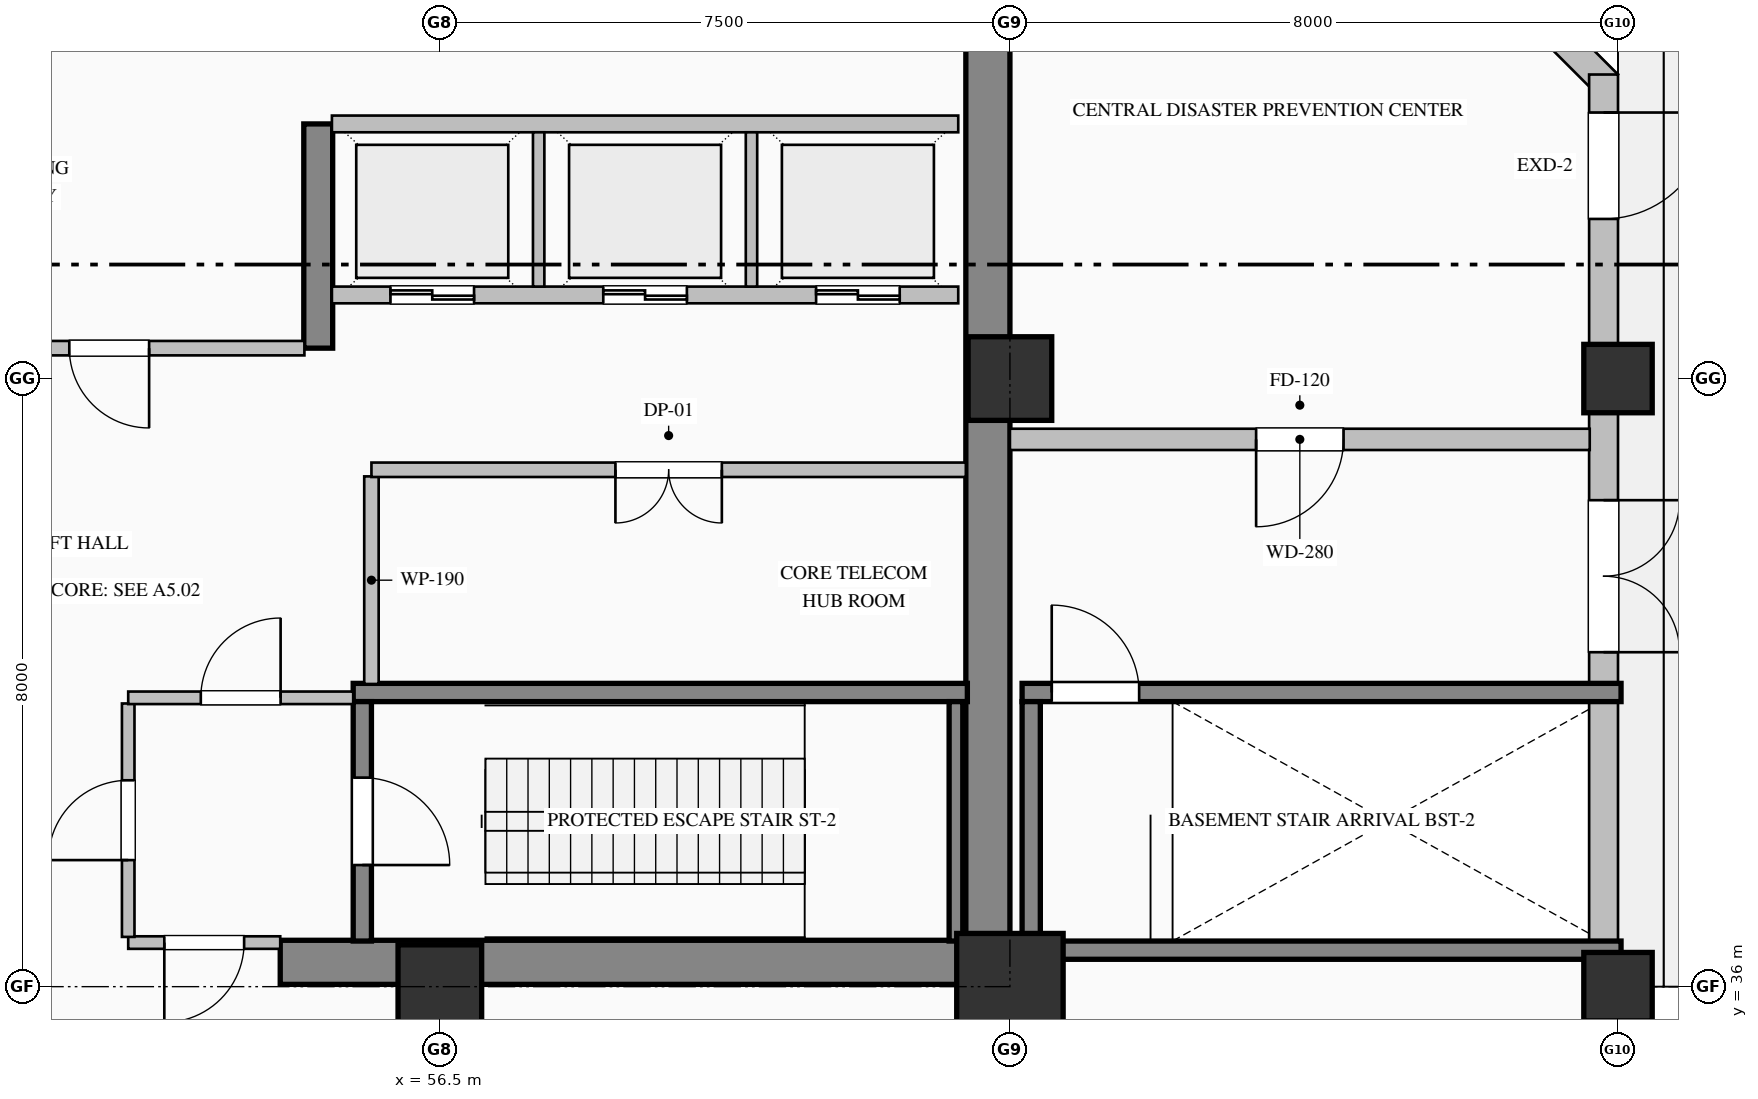
"""IFC4 building model, lengths in metres.
Left out: names, types, materials, properties, quantities, classifications, styles, units other than length and angle.
Written with IfcOpenShell. Run it as: python <this file> out.ifc"""

import sys

from ifc_helpers import new_model, si_unit, direction, frame, frame_2d, origin, origin_2d, place, context, subcontext, project, spatial, rectangle, hollow_rectangle, extrude, element, fill, save


model = new_model("IFC4")
c1 = context("Model", 3, precision=1e-05, world=origin(), true_north=direction((0.0, 1.0)))
c2 = subcontext(c1, "Body", "Model", "MODEL_VIEW")
j1 = project(units=[si_unit("LENGTHUNIT", "METRE"), si_unit("PLANEANGLEUNIT", "RADIAN")], contexts=[c1])
p1 = place(None, origin())
s1 = spatial("IfcSite", under=j1, at=p1, CompositionType="ELEMENT")
p2 = place(p1, origin())
s2 = spatial("IfcBuilding", under=s1, at=p2, CompositionType="ELEMENT")
p3 = place(p2, origin())
s3 = spatial("IfcBuildingStorey", under=s2, at=p3, CompositionType="ELEMENT", Elevation=0.0)
p4 = place(p3, frame((63.71, 36.32, 0.0), z_axis=(0.0, 0.0, 1.0), x_axis=(0.0, 1.0, 0.0)))
e1 = element("IfcWall", 1, at=p4, inside=s3, PredefinedType="SHEAR", context=c2, shape_type="SweptSolid", body=[
    extrude(rectangle(XDim=15.1, YDim=0.58, at=frame_2d((7.55, 0.0))), origin(), (0.0, 0.0, 1.0), 5.72),
])
p5 = place(p3, frame((54.4, 36.32, 0.0), z_axis=(0.0, 0.0, 1.0), x_axis=(1.0, 0.0, 0.0)))
e2 = element("IfcWall", 2, at=p5, inside=s3, PredefinedType="SHEAR", context=c2, shape_type="SweptSolid", body=[
    extrude(rectangle(XDim=9.6, YDim=0.58, at=frame_2d((4.8, 0.0))), origin(), (0.0, 0.0, 1.0), 6.0),
])
p6 = place(p3, frame((54.9, 44.4, 0.0), z_axis=(0.0, 0.0, 1.0), x_axis=(0.0, 1.0, 0.0)))
e3 = element("IfcWall", 3, at=p6, inside=s3, PredefinedType="SHEAR", context=c2, shape_type="SweptSolid", body=[
    extrude(rectangle(XDim=2.95, YDim=0.38, at=frame_2d((1.475, 0.0))), origin(), (0.0, 0.0, 1.0), 5.72),
])
p7 = place(p3, frame((56.5, 36.0, 0.0), z_axis=(0.0, 0.0, 1.0), x_axis=(1.0, 0.0, 0.0)))
e4 = element("IfcColumn", 4, at=p7, inside=s3, PredefinedType="COLUMN", context=c2, shape_type="SweptSolid", body=[
    extrude(rectangle(XDim=1.1, YDim=1.1, at=origin_2d()), origin(), (0.0, 0.0, 1.0), 6.0),
])
p8 = place(p3, frame((64.0, 36.0, 0.0), z_axis=(0.0, 0.0, 1.0), x_axis=(1.0, 0.0, 0.0)))
e5 = element("IfcColumn", 5, at=p8, inside=s3, PredefinedType="COLUMN", context=c2, shape_type="SweptSolid", body=[
    extrude(hollow_rectangle(XDim=1.4, YDim=1.4, WallThickness=0.05, at=origin_2d()), origin(), (0.0, 0.0, 1.0), 6.0),
])
p9 = place(p3, frame((64.0, 44.0, 0.0), z_axis=(0.0, 0.0, 1.0), x_axis=(1.0, 0.0, 0.0)))
e6 = element("IfcColumn", 6, at=p9, inside=s3, PredefinedType="COLUMN", context=c2, shape_type="SweptSolid", body=[
    extrude(rectangle(XDim=1.1, YDim=1.1, at=origin_2d()), origin(), (0.0, 0.0, 1.0), 6.0),
])
for number, where, z_axis, x_axis in (
    (7, (72.0, 36.0, 0.0), (0.0, 0.0, 1.0), (1.0, 0.0, 0.0)),
    (8, (72.0, 44.0, 0.0), (0.0, 0.0, 1.0), (1.0, 0.0, 0.0)),
):
    element("IfcColumn", number, at=place(p3, frame(where, z_axis=z_axis, x_axis=x_axis)), inside=s3, PredefinedType="PILASTER", context=c2, shape_type="SweptSolid", body=[
        extrude(rectangle(XDim=0.9, YDim=0.9, at=origin_2d()), origin(), (0.0, 0.0, 1.0), 6.0),
    ])
p10 = place(p3, frame((67.866, 51.866, 0.0), z_axis=(0.0, 0.0, 1.0), x_axis=(0.707106781187, -0.707106781187, 0.0)))
e9 = element("IfcWall", 9, at=p10, inside=s3, PredefinedType="SOLIDWALL", context=c2, shape_type="SweptSolid", body=[
    extrude(rectangle(XDim=5.657, YDim=0.38, at=frame_2d((2.828, 0.0))), origin(), (0.0, 0.0, 1.0), 5.72),
])
p11 = place(p3, frame((71.81, 48.0, 0.0), z_axis=(0.0, 0.0, 1.0), x_axis=(0.0, -1.0, 0.0)))
e10 = element("IfcWall", 10, at=p11, inside=s3, PredefinedType="SOLIDWALL", context=c2, shape_type="SweptSolid", body=[
    extrude(rectangle(XDim=44.0, YDim=0.38, at=frame_2d((22.0, 0.0))), origin(), (0.0, 0.0, 1.0), 5.22),
])
p12 = place(p11, frame((5.6, 0.0, 0.0)))
e11 = element("IfcOpeningElement", 11, at=p12, cuts=e10, PredefinedType="OPENING", context=c2, shape_type="SweptSolid", body=[
    extrude(rectangle(XDim=2.0, YDim=2.4, at=frame_2d((1.0, 1.2))), frame((0.0, 0.2, 0.0), z_axis=(0.0, -1.0, 0.0), x_axis=(1.0, 0.0, 0.0)), (0.0, 0.0, 1.0), 0.4),
])
p13 = place(p11, frame((0.5, 0.0, 0.0)))
e12 = element("IfcOpeningElement", 12, at=p13, cuts=e10, PredefinedType="OPENING", context=c2, shape_type="SweptSolid", body=[
    extrude(rectangle(XDim=1.4, YDim=2.25, at=frame_2d((0.7, 1.125))), frame((0.0, 0.2, 0.0), z_axis=(0.0, -1.0, 0.0), x_axis=(1.0, 0.0, 0.0)), (0.0, 0.0, 1.0), 0.4),
])
p14 = place(p3, frame((55.36, 39.87, 0.0), z_axis=(0.0, 0.0, 1.0), x_axis=(1.0, 0.0, 0.0)))
e13 = element("IfcWall", 13, at=p14, inside=s3, PredefinedType="SOLIDWALL", context=c2, shape_type="SweptSolid", body=[
    extrude(rectangle(XDim=8.08, YDim=0.24, at=frame_2d((4.04, 0.0))), origin(), (0.0, 0.0, 1.0), 6.0),
])
p15 = place(p3, frame((55.48, 39.75, 0.0), z_axis=(0.0, 0.0, 1.0), x_axis=(0.0, -1.0, 0.0)))
e14 = element("IfcWall", 14, at=p15, inside=s3, PredefinedType="SOLIDWALL", context=c2, shape_type="SweptSolid", body=[
    extrude(rectangle(XDim=3.15, YDim=0.24, at=frame_2d((1.575, 0.0))), origin(), (0.0, 0.0, 1.0), 6.0),
])
p16 = place(p15, frame((1.0, 0.0, 0.0)))
e15 = element("IfcOpeningElement", 15, at=p16, cuts=e14, PredefinedType="OPENING", context=c2, shape_type="SweptSolid", body=[
    extrude(rectangle(XDim=1.15, YDim=2.2, at=frame_2d((0.575, 1.1))), frame((0.0, 0.13, 0.0), z_axis=(0.0, -1.0, 0.0), x_axis=(1.0, 0.0, 0.0)), (0.0, 0.0, 1.0), 0.26),
])
p17 = place(p3, frame((63.29, 36.6, 0.0), z_axis=(0.0, 0.0, 1.0), x_axis=(0.0, 1.0, 0.0)))
e16 = element("IfcWall", 16, at=p17, inside=s3, PredefinedType="SOLIDWALL", context=c2, shape_type="SweptSolid", body=[
    extrude(rectangle(XDim=3.15, YDim=0.18, at=frame_2d((1.575, 0.0))), origin(), (0.0, 0.0, 1.0), 6.0),
])
p18 = place(p3, frame((64.16, 39.87, 0.0), z_axis=(0.0, 0.0, 1.0), x_axis=(1.0, 0.0, 0.0)))
e17 = element("IfcWall", 17, at=p18, inside=s3, PredefinedType="SOLIDWALL", context=c2, shape_type="SweptSolid", body=[
    extrude(rectangle(XDim=7.88, YDim=0.24, at=frame_2d((3.94, 0.0))), origin(), (0.0, 0.0, 1.0), 6.0),
])
p19 = place(p18, frame((0.39, 0.0, 0.0)))
e18 = element("IfcOpeningElement", 18, at=p19, cuts=e17, PredefinedType="OPENING", context=c2, shape_type="SweptSolid", body=[
    extrude(rectangle(XDim=1.15, YDim=2.2, at=frame_2d((0.575, 1.1))), frame((0.0, 0.13, 0.0), z_axis=(0.0, -1.0, 0.0), x_axis=(1.0, 0.0, 0.0)), (0.0, 0.0, 1.0), 0.26),
])
p20 = place(p3, frame((72.04, 36.48, 0.0), z_axis=(0.0, 0.0, 1.0), x_axis=(-1.0, 0.0, 0.0)))
e19 = element("IfcWall", 19, at=p20, inside=s3, PredefinedType="SOLIDWALL", context=c2, shape_type="SweptSolid", body=[
    extrude(rectangle(XDim=7.88, YDim=0.24, at=frame_2d((3.94, 0.0))), origin(), (0.0, 0.0, 1.0), 6.0),
])
p21 = place(p3, frame((64.28, 39.75, 0.0), z_axis=(0.0, 0.0, 1.0), x_axis=(0.0, -1.0, 0.0)))
e20 = element("IfcWall", 20, at=p21, inside=s3, PredefinedType="SOLIDWALL", context=c2, shape_type="SweptSolid", body=[
    extrude(rectangle(XDim=3.15, YDim=0.24, at=frame_2d((1.575, 0.0))), origin(), (0.0, 0.0, 1.0), 6.0),
])
p22 = place(p3, frame((63.32, 45.1, 0.0), z_axis=(0.0, 0.0, 1.0), x_axis=(-1.0, 0.0, 0.0)))
e21 = element("IfcWall", 21, at=p22, inside=s3, PredefinedType="PARTITIONING", context=c2, shape_type="SweptSolid", body=[
    extrude(rectangle(XDim=8.24, YDim=0.22, at=frame_2d((4.12, 0.0))), origin(), (0.0, 0.0, 1.0), 5.72),
])
p23 = place(p22, frame((6.37, 0.0, 0.0)))
e22 = element("IfcOpeningElement", 22, at=p23, cuts=e21, PredefinedType="OPENING", context=c2, shape_type="SweptSolid", body=[
    extrude(rectangle(XDim=1.1, YDim=2.2, at=frame_2d((0.55, 1.1))), frame((0.0, 0.12, 0.0), z_axis=(0.0, -1.0, 0.0), x_axis=(1.0, 0.0, 0.0)), (0.0, 0.0, 1.0), 0.24),
])
p24 = place(p22, frame((3.57, 0.0, 0.0)))
e23 = element("IfcOpeningElement", 23, at=p24, cuts=e21, PredefinedType="OPENING", context=c2, shape_type="SweptSolid", body=[
    extrude(rectangle(XDim=1.1, YDim=2.2, at=frame_2d((0.55, 1.1))), frame((0.0, 0.12, 0.0), z_axis=(0.0, -1.0, 0.0), x_axis=(1.0, 0.0, 0.0)), (0.0, 0.0, 1.0), 0.24),
])
p25 = place(p22, frame((0.77, 0.0, 0.0)))
e24 = element("IfcOpeningElement", 24, at=p25, cuts=e21, PredefinedType="OPENING", context=c2, shape_type="SweptSolid", body=[
    extrude(rectangle(XDim=1.1, YDim=2.2, at=frame_2d((0.55, 1.1))), frame((0.0, 0.12, 0.0), z_axis=(0.0, -1.0, 0.0), x_axis=(1.0, 0.0, 0.0)), (0.0, 0.0, 1.0), 0.24),
])
p26 = place(p3, frame((55.08, 47.35, 0.0), z_axis=(0.0, 0.0, 1.0), x_axis=(1.0, 0.0, 0.0)))
e25 = element("IfcWall", 25, at=p26, inside=s3, PredefinedType="PARTITIONING", context=c2, shape_type="SweptSolid", body=[
    extrude(rectangle(XDim=8.24, YDim=0.22, at=frame_2d((4.12, 0.0))), origin(), (0.0, 0.0, 1.0), 5.72),
])
for number, where, z_axis, x_axis in (
    (26, (57.8, 45.21, 0.0), (0.0, 0.0, 1.0), (0.0, 1.0, 0.0)),
    (27, (60.6, 45.21, 0.0), (0.0, 0.0, 1.0), (0.0, 1.0, 0.0)),
):
    element("IfcWall", number, at=place(p3, frame(where, z_axis=z_axis, x_axis=x_axis)), inside=s3, PredefinedType="PARTITIONING", context=c2, shape_type="SweptSolid", body=[
        extrude(rectangle(XDim=2.03, YDim=0.15, at=frame_2d((1.015, 0.0))), origin(), (0.0, 0.0, 1.0), 5.72),
    ])
p27 = place(p3, frame((54.4, 36.58, 0.0), z_axis=(0.0, 0.0, 1.0), x_axis=(-1.0, 0.0, 0.0)))
e28 = element("IfcWall", 28, at=p27, inside=s3, PredefinedType="PARTITIONING", context=c2, shape_type="SweptSolid", body=[
    extrude(rectangle(XDim=2.0, YDim=0.165, at=frame_2d((1.0, 0.0))), origin(), (0.0, 0.0, 1.0), 4.812),
])
p28 = place(p27, frame((0.475, 0.0, 0.0)))
e29 = element("IfcOpeningElement", 29, at=p28, cuts=e28, PredefinedType="OPENING", context=c2, shape_type="SweptSolid", body=[
    extrude(rectangle(XDim=1.05, YDim=2.15, at=frame_2d((0.525, 1.075))), frame((0.0, 0.093, 0.0), z_axis=(0.0, -1.0, 0.0), x_axis=(1.0, 0.0, 0.0)), (0.0, 0.0, 1.0), 0.185),
])
p29 = place(p3, frame((52.4, 36.655, 0.0), z_axis=(0.0, 0.0, 1.0), x_axis=(0.0, 1.0, 0.0)))
e30 = element("IfcWall", 30, at=p29, inside=s3, PredefinedType="PARTITIONING", context=c2, shape_type="SweptSolid", body=[
    extrude(rectangle(XDim=3.071, YDim=0.165, at=frame_2d((1.536, 0.0))), origin(), (0.0, 0.0, 1.0), 5.72),
])
p30 = place(p29, frame((1.01, 0.0, 0.0)))
e31 = element("IfcOpeningElement", 31, at=p30, cuts=e30, PredefinedType="OPENING", context=c2, shape_type="SweptSolid", body=[
    extrude(rectangle(XDim=1.05, YDim=2.15, at=frame_2d((0.525, 1.075))), frame((0.0, 0.093, 0.0), z_axis=(0.0, -1.0, 0.0), x_axis=(1.0, 0.0, 0.0)), (0.0, 0.0, 1.0), 0.185),
])
p31 = place(p3, frame((52.4, 39.8, 0.0), z_axis=(0.0, 0.0, 1.0), x_axis=(1.0, 0.0, 0.0)))
e32 = element("IfcWall", 32, at=p31, inside=s3, PredefinedType="PARTITIONING", context=c2, shape_type="SweptSolid", body=[
    extrude(rectangle(XDim=2.96, YDim=0.165, at=frame_2d((1.48, 0.0))), origin(), (0.0, 0.0, 1.0), 5.72),
])
p32 = place(p31, frame((0.955, 0.0, 0.0)))
e33 = element("IfcOpeningElement", 33, at=p32, cuts=e32, PredefinedType="OPENING", context=c2, shape_type="SweptSolid", body=[
    extrude(rectangle(XDim=1.05, YDim=2.15, at=frame_2d((0.525, 1.075))), frame((0.0, 0.093, 0.0), z_axis=(0.0, -1.0, 0.0), x_axis=(1.0, 0.0, 0.0)), (0.0, 0.0, 1.0), 0.185),
])
p33 = place(p3, frame((54.718, 44.4, 0.0), z_axis=(0.0, 0.0, 1.0), x_axis=(-1.0, 0.0, 0.0)))
e34 = element("IfcWall", 34, at=p33, inside=s3, PredefinedType="PARTITIONING", context=c2, shape_type="SweptSolid", body=[
    extrude(rectangle(XDim=5.136, YDim=0.19, at=frame_2d((2.568, 0.0))), origin(), (0.0, 0.0, 1.0), 5.72),
])
p34 = place(p33, frame((2.043, 0.0, 0.0)))
e35 = element("IfcOpeningElement", 35, at=p34, cuts=e34, PredefinedType="OPENING", context=c2, shape_type="SweptSolid", body=[
    extrude(rectangle(XDim=1.05, YDim=2.15, at=frame_2d((0.525, 1.075))), frame((0.0, 0.105, 0.0), z_axis=(0.0, -1.0, 0.0), x_axis=(1.0, 0.0, 0.0)), (0.0, 0.0, 1.0), 0.21),
])
p35 = place(p3, frame((55.6, 42.713, 0.0), z_axis=(0.0, 0.0, 1.0), x_axis=(0.0, -1.0, 0.0)))
e36 = element("IfcWall", 36, at=p35, inside=s3, PredefinedType="PARTITIONING", context=c2, shape_type="SweptSolid", body=[
    extrude(rectangle(XDim=2.731, YDim=0.19, at=frame_2d((1.365, 0.0))), origin(), (0.0, 0.0, 1.0), 5.72),
])
p36 = place(p3, frame((63.42, 42.8, 0.0), z_axis=(0.0, 0.0, 1.0), x_axis=(-1.0, 0.0, 0.0)))
e37 = element("IfcWall", 37, at=p36, inside=s3, PredefinedType="PARTITIONING", context=c2, shape_type="SweptSolid", body=[
    extrude(rectangle(XDim=7.82, YDim=0.19, at=frame_2d((3.91, 0.0))), origin(), (0.0, 0.0, 1.0), 5.72),
])
p37 = place(p36, frame((3.21, 0.0, 0.0)))
e38 = element("IfcOpeningElement", 38, at=p37, cuts=e37, PredefinedType="OPENING", context=c2, shape_type="SweptSolid", body=[
    extrude(rectangle(XDim=1.4, YDim=2.25, at=frame_2d((0.7, 1.125))), frame((0.0, 0.105, 0.0), z_axis=(0.0, -1.0, 0.0), x_axis=(1.0, 0.0, 0.0)), (0.0, 0.0, 1.0), 0.21),
])
p38 = place(p3, frame((71.628, 43.2, 0.0), z_axis=(0.0, 0.0, 1.0), x_axis=(-1.0, 0.0, 0.0)))
e39 = element("IfcWall", 39, at=p38, inside=s3, PredefinedType="SOLIDWALL", context=c2, shape_type="SweptSolid", body=[
    extrude(rectangle(XDim=7.628, YDim=0.28, at=frame_2d((3.814, 0.0))), origin(), (0.0, 0.0, 1.0), 5.72),
])
p39 = place(p38, frame((3.239, 0.0, 0.0)))
e40 = element("IfcOpeningElement", 40, at=p39, cuts=e39, PredefinedType="OPENING", context=c2, shape_type="SweptSolid", body=[
    extrude(rectangle(XDim=1.15, YDim=2.2, at=frame_2d((0.575, 1.1))), frame((0.0, 0.15, 0.0), z_axis=(0.0, -1.0, 0.0), x_axis=(1.0, 0.0, 0.0)), (0.0, 0.0, 1.0), 0.3),
])
p40 = place(p12, origin())
e41 = element("IfcDoor", 41, at=p40, inside=s3, OperationType="DOUBLE_DOOR_SINGLE_SWING", PredefinedType="DOOR", context=c2, shape_type="SweptSolid", body=[
    extrude(rectangle(XDim=2.0, YDim=2.4, at=frame_2d((1.0, 1.2))), frame((0.0, 0.025, 0.0), z_axis=(0.0, -1.0, 0.0), x_axis=(1.0, 0.0, 0.0)), (0.0, 0.0, 1.0), 0.05),
])
fill(e11, e41)
p41 = place(p13, origin())
e42 = element("IfcDoor", 42, at=p41, inside=s3, OperationType="SINGLE_SWING_LEFT", PredefinedType="DOOR", context=c2, shape_type="SweptSolid", body=[
    extrude(rectangle(XDim=1.4, YDim=2.25, at=frame_2d((0.7, 1.125))), frame((0.0, 0.025, 0.0), z_axis=(0.0, -1.0, 0.0), x_axis=(1.0, 0.0, 0.0)), (0.0, 0.0, 1.0), 0.05),
])
fill(e12, e42)
p42 = place(p16, origin())
e43 = element("IfcDoor", 43, at=p42, inside=s3, OperationType="SINGLE_SWING_RIGHT", PredefinedType="DOOR", context=c2, shape_type="SweptSolid", body=[
    extrude(rectangle(XDim=1.15, YDim=2.2, at=frame_2d((0.575, 1.1))), frame((0.0, 0.025, 0.0), z_axis=(0.0, -1.0, 0.0), x_axis=(1.0, 0.0, 0.0)), (0.0, 0.0, 1.0), 0.05),
])
fill(e15, e43)
p43 = place(p19, origin())
e44 = element("IfcDoor", 44, at=p43, inside=s3, OperationType="SINGLE_SWING_LEFT", PredefinedType="DOOR", context=c2, shape_type="SweptSolid", body=[
    extrude(rectangle(XDim=1.15, YDim=2.2, at=frame_2d((0.575, 1.1))), frame((0.0, 0.025, 0.0), z_axis=(0.0, -1.0, 0.0), x_axis=(1.0, 0.0, 0.0)), (0.0, 0.0, 1.0), 0.05),
])
fill(e18, e44)
p44 = place(p23, origin())
e45 = element("IfcDoor", 45, at=p44, inside=s3, OperationType="DOUBLE_DOOR_SLIDING", PredefinedType="DOOR", context=c2, shape_type="SweptSolid", body=[
    extrude(rectangle(XDim=1.1, YDim=2.2, at=frame_2d((0.55, 1.1))), frame((0.0, 0.025, 0.0), z_axis=(0.0, -1.0, 0.0), x_axis=(1.0, 0.0, 0.0)), (0.0, 0.0, 1.0), 0.05),
])
fill(e22, e45)
p45 = place(p24, origin())
e46 = element("IfcDoor", 46, at=p45, inside=s3, OperationType="DOUBLE_DOOR_SLIDING", PredefinedType="DOOR", context=c2, shape_type="SweptSolid", body=[
    extrude(rectangle(XDim=1.1, YDim=2.2, at=frame_2d((0.55, 1.1))), frame((0.0, 0.025, 0.0), z_axis=(0.0, -1.0, 0.0), x_axis=(1.0, 0.0, 0.0)), (0.0, 0.0, 1.0), 0.05),
])
fill(e23, e46)
p46 = place(p25, origin())
e47 = element("IfcDoor", 47, at=p46, inside=s3, OperationType="DOUBLE_DOOR_SLIDING", PredefinedType="DOOR", context=c2, shape_type="SweptSolid", body=[
    extrude(rectangle(XDim=1.1, YDim=2.2, at=frame_2d((0.55, 1.1))), frame((0.0, 0.025, 0.0), z_axis=(0.0, -1.0, 0.0), x_axis=(1.0, 0.0, 0.0)), (0.0, 0.0, 1.0), 0.05),
])
fill(e24, e47)
p47 = place(p34, origin())
e48 = element("IfcDoor", 48, at=p47, inside=s3, OperationType="SINGLE_SWING_LEFT", PredefinedType="DOOR", context=c2, shape_type="SweptSolid", body=[
    extrude(rectangle(XDim=1.05, YDim=2.15, at=frame_2d((0.525, 1.075))), frame((0.0, 0.025, 0.0), z_axis=(0.0, -1.0, 0.0), x_axis=(1.0, 0.0, 0.0)), (0.0, 0.0, 1.0), 0.05),
])
fill(e35, e48)
p48 = place(p30, origin())
e49 = element("IfcDoor", 49, at=p48, inside=s3, OperationType="SINGLE_SWING_LEFT", PredefinedType="DOOR", context=c2, shape_type="SweptSolid", body=[
    extrude(rectangle(XDim=1.05, YDim=2.15, at=frame_2d((0.525, 1.075))), frame((0.0, 0.025, 0.0), z_axis=(0.0, -1.0, 0.0), x_axis=(1.0, 0.0, 0.0)), (0.0, 0.0, 1.0), 0.05),
])
fill(e31, e49)
p49 = place(p32, origin())
e50 = element("IfcDoor", 50, at=p49, inside=s3, OperationType="SINGLE_SWING_RIGHT", PredefinedType="DOOR", context=c2, shape_type="SweptSolid", body=[
    extrude(rectangle(XDim=1.05, YDim=2.15, at=frame_2d((0.525, 1.075))), frame((0.0, 0.025, 0.0), z_axis=(0.0, -1.0, 0.0), x_axis=(1.0, 0.0, 0.0)), (0.0, 0.0, 1.0), 0.05),
])
fill(e33, e50)
p50 = place(p28, origin())
e51 = element("IfcDoor", 51, at=p50, inside=s3, OperationType="SINGLE_SWING_RIGHT", PredefinedType="DOOR", context=c2, shape_type="SweptSolid", body=[
    extrude(rectangle(XDim=1.05, YDim=2.15, at=frame_2d((0.525, 1.075))), frame((0.0, 0.025, 0.0), z_axis=(0.0, -1.0, 0.0), x_axis=(1.0, 0.0, 0.0)), (0.0, 0.0, 1.0), 0.05),
])
fill(e29, e51)
p51 = place(p37, origin())
e52 = element("IfcDoor", 52, at=p51, inside=s3, OperationType="DOUBLE_DOOR_SINGLE_SWING", PredefinedType="DOOR", context=c2, shape_type="SweptSolid", body=[
    extrude(rectangle(XDim=1.4, YDim=2.25, at=frame_2d((0.7, 1.125))), frame((0.0, 0.025, 0.0), z_axis=(0.0, -1.0, 0.0), x_axis=(1.0, 0.0, 0.0)), (0.0, 0.0, 1.0), 0.05),
])
fill(e38, e52)
p52 = place(p39, origin())
e53 = element("IfcDoor", 53, at=p52, inside=s3, OperationType="SINGLE_SWING_RIGHT", PredefinedType="DOOR", context=c2, shape_type="SweptSolid", body=[
    extrude(rectangle(XDim=1.15, YDim=2.2, at=frame_2d((0.575, 1.1))), frame((0.0, 0.025, 0.0), z_axis=(0.0, -1.0, 0.0), x_axis=(1.0, 0.0, 0.0)), (0.0, 0.0, 1.0), 0.05),
])
fill(e40, e53)
save(model, sys.argv[1])
